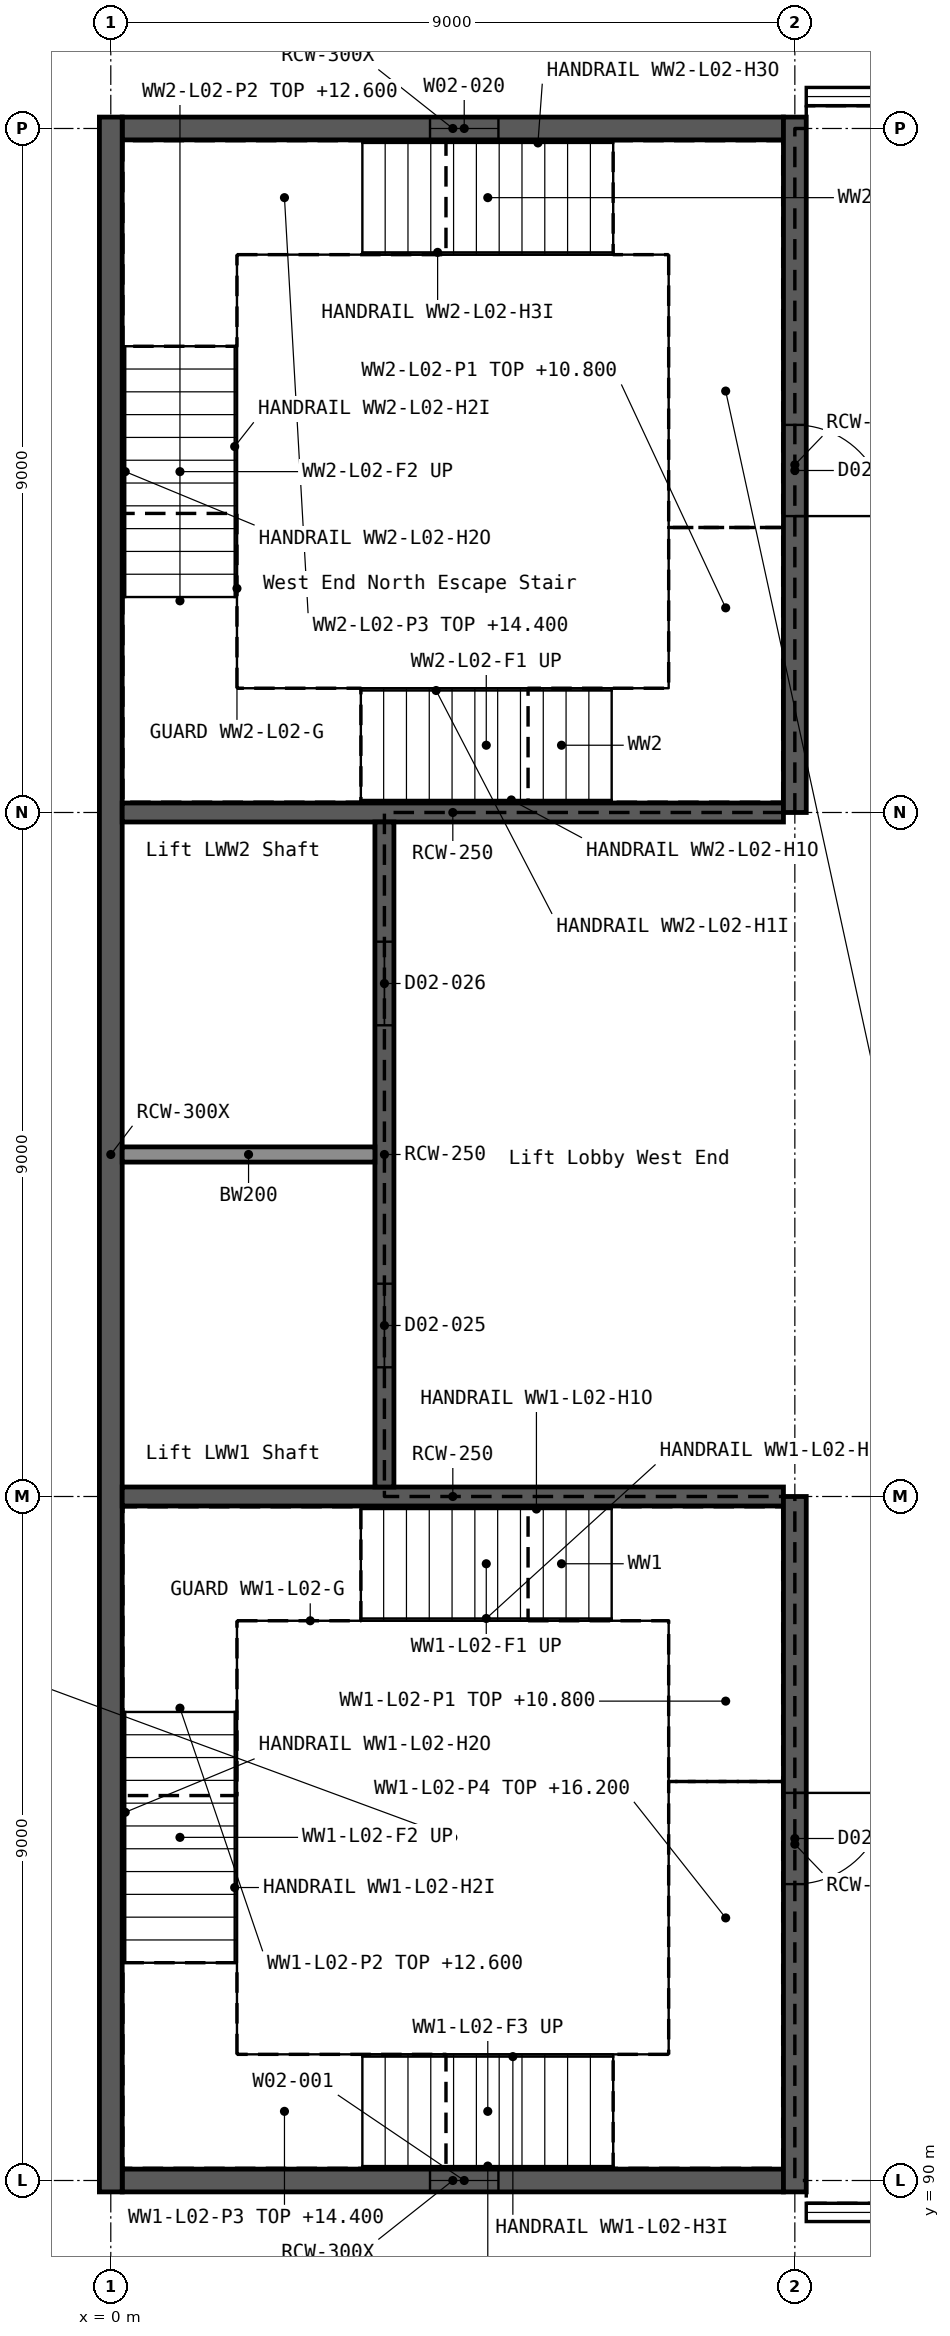
"""IFC4 building model, lengths in metres.
Left out: names, types, materials, properties, quantities, classifications, styles, units other than length and angle.
Written with IfcOpenShell. Run it as: python <this file> out.ifc"""

import sys

from ifc_helpers import new_model, si_unit, direction, frame, frame_2d, origin, place, context, subcontext, project, spatial, rectangle, extrude, element, fill, save


model = new_model("IFC4")
c1 = context("Model", 3, precision=1e-05, world=origin(), true_north=direction((0.0, 1.0)))
c2 = subcontext(c1, "Body", "Model", "MODEL_VIEW")
j1 = project(units=[si_unit("LENGTHUNIT", "METRE"), si_unit("PLANEANGLEUNIT", "RADIAN")], contexts=[c1])
p1 = place(None, origin())
s1 = spatial("IfcSite", under=j1, at=p1, CompositionType="ELEMENT")
p2 = place(p1, origin())
s2 = spatial("IfcBuilding", under=s1, at=p2, CompositionType="ELEMENT")
p3 = place(p2, frame((0.0, 0.0, 10.8)))
s3 = spatial("IfcBuildingStorey", under=s2, at=p3, CompositionType="ELEMENT", Elevation=10.8)
p4 = place(p3, frame((0.15, 90.0, 0.0), z_axis=(0.0, 0.0, 1.0), x_axis=(1.0, 0.0, 0.0)))
e1 = element("IfcWall", 1, at=p4, inside=s3, PredefinedType="SHEAR", context=c2, shape_type="SweptSolid", body=[
    extrude(rectangle(XDim=8.7, YDim=0.3, at=frame_2d((4.35, 0.0))), origin(), (0.0, 0.0, 1.0), 5.4),
])
p5 = place(p4, frame((4.05, 0.0, 1.5)))
e2 = element("IfcOpeningElement", 2, at=p5, cuts=e1, PredefinedType="OPENING", context=c2, shape_type="SweptSolid", body=[
    extrude(rectangle(XDim=0.9, YDim=1.2, at=frame_2d((0.45, 0.6))), frame((0.0, 0.161, 0.0), z_axis=(0.0, -1.0, 0.0), x_axis=(1.0, 0.0, 0.0)), (0.0, 0.0, 1.0), 0.322),
])
p6 = place(p3, frame((0.15, 117.0, 0.0), z_axis=(0.0, 0.0, 1.0), x_axis=(1.0, 0.0, 0.0)))
e3 = element("IfcWall", 3, at=p6, inside=s3, PredefinedType="SHEAR", context=c2, shape_type="SweptSolid", body=[
    extrude(rectangle(XDim=8.7, YDim=0.3, at=frame_2d((4.35, 0.0))), origin(), (0.0, 0.0, 1.0), 5.4),
])
p7 = place(p6, frame((4.05, 0.0, 1.5)))
e4 = element("IfcOpeningElement", 4, at=p7, cuts=e3, PredefinedType="OPENING", context=c2, shape_type="SweptSolid", body=[
    extrude(rectangle(XDim=0.9, YDim=1.2, at=frame_2d((0.45, 0.6))), frame((0.0, 0.161, 0.0), z_axis=(0.0, -1.0, 0.0), x_axis=(1.0, 0.0, 0.0)), (0.0, 0.0, 1.0), 0.322),
])
p8 = place(p3, frame((0.0, 89.85, 0.0), z_axis=(0.0, 0.0, 1.0), x_axis=(0.0, 1.0, 0.0)))
e5 = element("IfcWall", 5, at=p8, inside=s3, PredefinedType="SHEAR", context=c2, shape_type="SweptSolid", body=[
    extrude(rectangle(XDim=27.3, YDim=0.3, at=frame_2d((13.65, 0.0))), origin(), (0.0, 0.0, 1.0), 5.4),
])
for number, where, z_axis, x_axis in (
    (6, (0.15, 99.0, 0.0), (0.0, 0.0, 1.0), (1.0, 0.0, 0.0)),
    (7, (0.15, 108.0, 0.0), (0.0, 0.0, 1.0), (1.0, 0.0, 0.0)),
):
    element("IfcWall", number, at=place(p3, frame(where, z_axis=z_axis, x_axis=x_axis)), inside=s3, PredefinedType="SHEAR", context=c2, shape_type="SweptSolid", body=[
        extrude(rectangle(XDim=8.7, YDim=0.25, at=frame_2d((4.35, 0.0))), origin(), (0.0, 0.0, 1.0), 5.4),
    ])
p9 = place(p3, frame((3.6, 99.125, 0.0), z_axis=(0.0, 0.0, 1.0), x_axis=(0.0, 1.0, 0.0)))
e8 = element("IfcWall", 8, at=p9, inside=s3, PredefinedType="SHEAR", context=c2, shape_type="SweptSolid", body=[
    extrude(rectangle(XDim=8.75, YDim=0.25, at=frame_2d((4.375, 0.0))), origin(), (0.0, 0.0, 1.0), 5.4),
])
p10 = place(p9, frame((1.575, 0.0, 0.0)))
e9 = element("IfcOpeningElement", 9, at=p10, cuts=e8, PredefinedType="OPENING", context=c2, shape_type="SweptSolid", body=[
    extrude(rectangle(XDim=1.1, YDim=2.1, at=frame_2d((0.55, 1.05))), frame((0.0, 0.136, 0.0), z_axis=(0.0, -1.0, 0.0), x_axis=(1.0, 0.0, 0.0)), (0.0, 0.0, 1.0), 0.272),
])
p11 = place(p9, frame((6.075, 0.0, 0.0)))
e10 = element("IfcOpeningElement", 10, at=p11, cuts=e8, PredefinedType="OPENING", context=c2, shape_type="SweptSolid", body=[
    extrude(rectangle(XDim=1.1, YDim=2.1, at=frame_2d((0.55, 1.05))), frame((0.0, 0.136, 0.0), z_axis=(0.0, -1.0, 0.0), x_axis=(1.0, 0.0, 0.0)), (0.0, 0.0, 1.0), 0.272),
])
p12 = place(p3, frame((9.0, 89.85, 0.0), z_axis=(0.0, 0.0, 1.0), x_axis=(0.0, 1.0, 0.0)))
e11 = element("IfcWall", 11, at=p12, inside=s3, PredefinedType="SHEAR", context=c2, shape_type="SweptSolid", body=[
    extrude(rectangle(XDim=9.15, YDim=0.3, at=frame_2d((4.575, 0.0))), origin(), (0.0, 0.0, 1.0), 5.4),
])
p13 = place(p12, frame((4.05, 0.0, 0.0)))
e12 = element("IfcOpeningElement", 12, at=p13, cuts=e11, PredefinedType="OPENING", context=c2, shape_type="SweptSolid", body=[
    extrude(rectangle(XDim=1.2, YDim=2.1, at=frame_2d((0.6, 1.05))), frame((0.0, 0.161, 0.0), z_axis=(0.0, -1.0, 0.0), x_axis=(1.0, 0.0, 0.0)), (0.0, 0.0, 1.0), 0.322),
])
p14 = place(p3, frame((9.0, 108.0, 0.0), z_axis=(0.0, 0.0, 1.0), x_axis=(0.0, 1.0, 0.0)))
e13 = element("IfcWall", 13, at=p14, inside=s3, PredefinedType="SHEAR", context=c2, shape_type="SweptSolid", body=[
    extrude(rectangle(XDim=9.15, YDim=0.3, at=frame_2d((4.575, 0.0))), origin(), (0.0, 0.0, 1.0), 5.4),
])
p15 = place(p14, frame((3.9, 0.0, 0.0)))
e14 = element("IfcOpeningElement", 14, at=p15, cuts=e13, PredefinedType="OPENING", context=c2, shape_type="SweptSolid", body=[
    extrude(rectangle(XDim=1.2, YDim=2.1, at=frame_2d((0.6, 1.05))), frame((0.0, 0.161, 0.0), z_axis=(0.0, -1.0, 0.0), x_axis=(1.0, 0.0, 0.0)), (0.0, 0.0, 1.0), 0.322),
])
p16 = place(p3, frame((0.15, 103.5, 0.0), z_axis=(0.0, 0.0, 1.0), x_axis=(1.0, 0.0, 0.0)))
e15 = element("IfcWall", 15, at=p16, inside=s3, PredefinedType="SOLIDWALL", context=c2, shape_type="SweptSolid", body=[
    extrude(rectangle(XDim=3.325, YDim=0.2, at=frame_2d((1.663, 0.0))), origin(), (0.0, 0.0, 1.0), 5.4),
])
p17 = place(p5, origin())
e16 = element("IfcWindow", 16, at=p17, inside=s3, PartitioningType="SINGLE_PANEL", PredefinedType="WINDOW", context=c2, shape_type="SweptSolid", body=[
    extrude(rectangle(XDim=0.9, YDim=1.2, at=frame_2d((0.45, 0.6))), frame((0.0, 0.03, 0.0), z_axis=(0.0, -1.0, 0.0), x_axis=(1.0, 0.0, 0.0)), (0.0, 0.0, 1.0), 0.06),
])
fill(e2, e16)
p18 = place(p7, origin())
e17 = element("IfcWindow", 17, at=p18, inside=s3, PartitioningType="SINGLE_PANEL", PredefinedType="WINDOW", context=c2, shape_type="SweptSolid", body=[
    extrude(rectangle(XDim=0.9, YDim=1.2, at=frame_2d((0.45, 0.6))), frame((0.0, 0.03, 0.0), z_axis=(0.0, -1.0, 0.0), x_axis=(1.0, 0.0, 0.0)), (0.0, 0.0, 1.0), 0.06),
])
fill(e4, e17)
p19 = place(p13, frame((1.2, 0.0, 0.0), z_axis=(0.0, 0.0, 1.0), x_axis=(-1.0, 0.0, 0.0)))
e18 = element("IfcDoor", 18, at=p19, inside=s3, OperationType="SINGLE_SWING_LEFT", PredefinedType="DOOR", context=c2, shape_type="SweptSolid", body=[
    extrude(rectangle(XDim=1.2, YDim=2.1, at=frame_2d((0.6, 1.05))), frame((0.0, 0.025, 0.0), z_axis=(0.0, -1.0, 0.0), x_axis=(1.0, 0.0, 0.0)), (0.0, 0.0, 1.0), 0.05),
])
fill(e12, e18)
p20 = place(p15, frame((1.2, 0.0, 0.0), z_axis=(0.0, 0.0, 1.0), x_axis=(-1.0, 0.0, 0.0)))
e19 = element("IfcDoor", 19, at=p20, inside=s3, OperationType="SINGLE_SWING_RIGHT", PredefinedType="DOOR", context=c2, shape_type="SweptSolid", body=[
    extrude(rectangle(XDim=1.2, YDim=2.1, at=frame_2d((0.6, 1.05))), frame((0.0, 0.025, 0.0), z_axis=(0.0, -1.0, 0.0), x_axis=(1.0, 0.0, 0.0)), (0.0, 0.0, 1.0), 0.05),
])
fill(e14, e19)
p21 = place(p10, origin())
e20 = element("IfcDoor", 20, at=p21, inside=s3, OperationType="DOUBLE_DOOR_SLIDING", PredefinedType="DOOR", context=c2, shape_type="SweptSolid", body=[
    extrude(rectangle(XDim=1.1, YDim=2.1, at=frame_2d((0.55, 1.05))), frame((0.0, 0.025, 0.0), z_axis=(0.0, -1.0, 0.0), x_axis=(1.0, 0.0, 0.0)), (0.0, 0.0, 1.0), 0.05),
])
fill(e9, e20)
p22 = place(p11, origin())
e21 = element("IfcDoor", 21, at=p22, inside=s3, OperationType="DOUBLE_DOOR_SLIDING", PredefinedType="DOOR", context=c2, shape_type="SweptSolid", body=[
    extrude(rectangle(XDim=1.1, YDim=2.1, at=frame_2d((0.55, 1.05))), frame((0.0, 0.025, 0.0), z_axis=(0.0, -1.0, 0.0), x_axis=(1.0, 0.0, 0.0)), (0.0, 0.0, 1.0), 0.05),
])
fill(e10, e21)
save(model, sys.argv[1])
